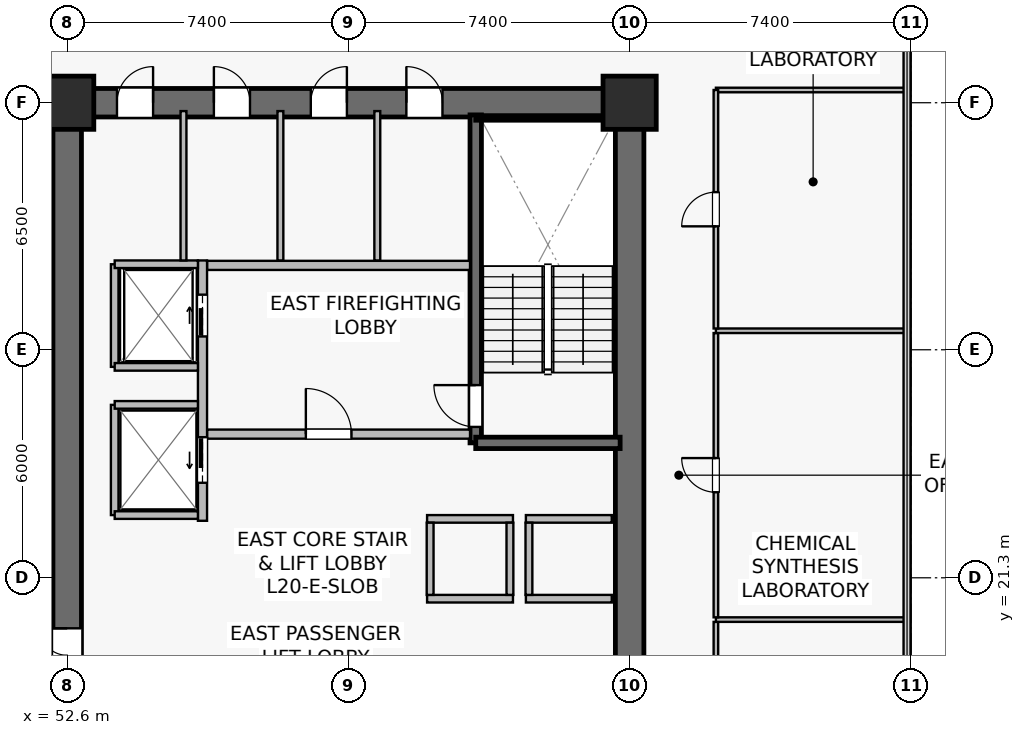
"""IFC4 building model, lengths in metres.
Left out: names, types, materials, properties, quantities, classifications, styles, units other than length and angle.
Written with IfcOpenShell. Run it as: python <this file> out.ifc"""

import sys

from ifc_helpers import new_model, si_unit, direction, frame, frame_2d, origin, origin_2d, place, context, subcontext, project, spatial, rectangle, extrude, source, transform, mapped, element, fill, save


model = new_model("IFC4")
c1 = context("Model", 3, precision=1e-05, world=origin(), true_north=direction((0.0, 1.0)))
c2 = subcontext(c1, "Body", "Model", "MODEL_VIEW")
j1 = project(units=[si_unit("LENGTHUNIT", "METRE"), si_unit("PLANEANGLEUNIT", "RADIAN")], contexts=[c1])
p1 = place(None, origin())
s1 = spatial("IfcSite", under=j1, at=p1, CompositionType="ELEMENT")
p2 = place(p1, origin())
s2 = spatial("IfcBuilding", under=s1, at=p2, CompositionType="ELEMENT")
p3 = place(p2, frame((0.0, 0.0, 82.6)))
s3 = spatial("IfcBuildingStorey", under=s2, at=p3, CompositionType="ELEMENT", Elevation=82.6)
p4 = place(p3, frame((52.225, 33.8, 0.0), z_axis=(0.0, 0.0, 1.0), x_axis=(1.0, 0.0, 0.0)))
e1 = element("IfcWall", 1, at=p4, inside=s3, PredefinedType="SHEAR", context=c2, shape_type="SweptSolid", body=[
    extrude(rectangle(XDim=15.55, YDim=0.75, at=frame_2d((7.775, 0.0))), origin(), (0.0, 0.0, 1.0), 3.78),
])
p5 = place(p4, frame((9.3, 0.0, 0.0)))
e2 = element("IfcOpeningElement", 2, at=p5, cuts=e1, PredefinedType="OPENING", context=c2, shape_type="SweptSolid", body=[
    extrude(rectangle(XDim=0.95, YDim=2.15, at=frame_2d((0.475, 1.075))), frame((0.0, 0.385, 0.0), z_axis=(0.0, -1.0, 0.0), x_axis=(1.0, 0.0, 0.0)), (0.0, 0.0, 1.0), 0.77),
])
p6 = place(p4, frame((6.785, 0.0, 0.0)))
e3 = element("IfcOpeningElement", 3, at=p6, cuts=e1, PredefinedType="OPENING", context=c2, shape_type="SweptSolid", body=[
    extrude(rectangle(XDim=0.95, YDim=2.15, at=frame_2d((0.475, 1.075))), frame((0.0, 0.385, 0.0), z_axis=(0.0, -1.0, 0.0), x_axis=(1.0, 0.0, 0.0)), (0.0, 0.0, 1.0), 0.77),
])
p7 = place(p4, frame((4.235, 0.0, 0.0)))
e4 = element("IfcOpeningElement", 4, at=p7, cuts=e1, PredefinedType="OPENING", context=c2, shape_type="SweptSolid", body=[
    extrude(rectangle(XDim=0.95, YDim=2.15, at=frame_2d((0.475, 1.075))), frame((0.0, 0.385, 0.0), z_axis=(0.0, -1.0, 0.0), x_axis=(1.0, 0.0, 0.0)), (0.0, 0.0, 1.0), 0.77),
])
p8 = place(p4, frame((1.685, 0.0, 0.0)))
e5 = element("IfcOpeningElement", 5, at=p8, cuts=e1, PredefinedType="OPENING", context=c2, shape_type="SweptSolid", body=[
    extrude(rectangle(XDim=0.95, YDim=2.15, at=frame_2d((0.475, 1.075))), frame((0.0, 0.385, 0.0), z_axis=(0.0, -1.0, 0.0), x_axis=(1.0, 0.0, 0.0)), (0.0, 0.0, 1.0), 0.77),
])
p9 = place(p3, frame((52.6, 15.175, 0.0), z_axis=(0.0, 0.0, 1.0), x_axis=(0.0, 1.0, 0.0)))
e6 = element("IfcWall", 6, at=p9, inside=s3, PredefinedType="SHEAR", context=c2, shape_type="SweptSolid", body=[
    extrude(rectangle(XDim=18.25, YDim=0.75, at=frame_2d((9.125, 0.0))), origin(), (0.0, 0.0, 1.0), 3.78),
])
p10 = place(p9, frame((3.375, 0.0, 0.0)))
e7 = element("IfcOpeningElement", 7, at=p10, cuts=e6, PredefinedType="OPENING", context=c2, shape_type="SweptSolid", body=[
    extrude(rectangle(XDim=1.42, YDim=2.2, at=frame_2d((0.71, 1.1))), frame((0.0, 0.385, 0.0), z_axis=(0.0, -1.0, 0.0), x_axis=(1.0, 0.0, 0.0)), (0.0, 0.0, 1.0), 0.77),
])
p11 = place(p3, frame((67.4, 15.175, 0.0), z_axis=(0.0, 0.0, 1.0), x_axis=(0.0, 1.0, 0.0)))
e8 = element("IfcWall", 8, at=p11, inside=s3, PredefinedType="SHEAR", context=c2, shape_type="SweptSolid", body=[
    extrude(rectangle(XDim=18.25, YDim=0.75, at=frame_2d((9.125, 0.0))), origin(), (0.0, 0.0, 1.0), 3.78),
])
p12 = place(p3, frame((63.35, 24.85, 0.0), z_axis=(0.0, 0.0, 1.0), x_axis=(0.0, 1.0, 0.0)))
e9 = element("IfcWall", 9, at=p12, inside=s3, PredefinedType="SHEAR", context=c2, shape_type="SweptSolid", body=[
    extrude(rectangle(XDim=8.63, YDim=0.3, at=frame_2d((4.315, 0.0))), origin(), (0.0, 0.0, 1.0), 3.78),
])
p13 = place(p12, frame((0.42, 0.0, 0.0)))
e10 = element("IfcOpeningElement", 10, at=p13, cuts=e9, PredefinedType="OPENING", context=c2, shape_type="SweptSolid", body=[
    extrude(rectangle(XDim=1.1, YDim=2.15, at=frame_2d((0.55, 1.075))), frame((0.0, 0.16, 0.0), z_axis=(0.0, -1.0, 0.0), x_axis=(1.0, 0.0, 0.0)), (0.0, 0.0, 1.0), 0.32),
])
p14 = place(p3, frame((63.35, 24.85, 0.0), z_axis=(0.0, 0.0, 1.0), x_axis=(1.0, 0.0, 0.0)))
e11 = element("IfcWall", 11, at=p14, inside=s3, PredefinedType="SHEAR", context=c2, shape_type="SweptSolid", body=[
    extrude(rectangle(XDim=3.8, YDim=0.3, at=frame_2d((1.9, 0.0))), origin(), (0.0, 0.0, 1.0), 3.78),
])
p15 = place(p3, frame((63.35, 33.4, 0.0), z_axis=(0.0, 0.0, 1.0), x_axis=(1.0, 0.0, 0.0)))
e12 = element("IfcWall", 12, at=p15, inside=s3, PredefinedType="SOLIDWALL", context=c2, shape_type="SweptSolid", body=[
    extrude(rectangle(XDim=3.72, YDim=0.12, at=frame_2d((1.86, 0.0))), origin(), (0.0, 0.0, 1.0), 3.78),
])
m1 = source(origin(), c2, "Body", "SweptSolid", [
    extrude(rectangle(XDim=1.4, YDim=1.4, at=origin_2d()), origin(), (0.0, 0.0, 1.0), 4.1),
])
for number, where, z_axis, x_axis in (
    (13, (52.6, 33.8, 0.0), (0.0, 0.0, 1.0), (1.0, 0.0, 0.0)),
    (14, (67.4, 33.8, 0.0), (0.0, 0.0, 1.0), (1.0, 0.0, 0.0)),
):
    element("IfcColumn", number, at=place(p3, frame(where, z_axis=z_axis, x_axis=x_axis)), inside=s3, PredefinedType="COLUMN", context=c2, shape_type="MappedRepresentation", body=[
        mapped(m1, transform((0.0, 0.0, 0.0), scale=1.0)),
    ])
p16 = place(p3, frame((56.28, 25.08, 0.0), z_axis=(0.0, 0.0, 1.0), x_axis=(1.0, 0.0, 0.0)))
e15 = element("IfcWall", 15, at=p16, inside=s3, PredefinedType="SOLIDWALL", context=c2, shape_type="SweptSolid", body=[
    extrude(rectangle(XDim=6.92, YDim=0.24, at=frame_2d((3.46, 0.0))), origin(), (0.0, 0.0, 1.0), 3.115),
])
p17 = place(p16, frame((2.6, 0.0, 0.0)))
e16 = element("IfcOpeningElement", 16, at=p17, cuts=e15, PredefinedType="OPENING", context=c2, shape_type="SweptSolid", body=[
    extrude(rectangle(XDim=1.2, YDim=2.16, at=frame_2d((0.6, 1.08))), frame((0.0, 0.13, 0.0), z_axis=(0.0, -1.0, 0.0), x_axis=(1.0, 0.0, 0.0)), (0.0, 0.0, 1.0), 0.26),
])
p18 = place(p3, frame((56.28, 29.52, 0.0), z_axis=(0.0, 0.0, 1.0), x_axis=(1.0, 0.0, 0.0)))
e17 = element("IfcWall", 17, at=p18, inside=s3, PredefinedType="SOLIDWALL", context=c2, shape_type="SweptSolid", body=[
    extrude(rectangle(XDim=6.92, YDim=0.24, at=frame_2d((3.46, 0.0))), origin(), (0.0, 0.0, 1.0), 3.115),
])
p19 = place(p3, frame((56.16, 22.8, 0.0), z_axis=(0.0, 0.0, 1.0), x_axis=(0.0, 1.0, 0.0)))
e18 = element("IfcWall", 18, at=p19, inside=s3, PredefinedType="SOLIDWALL", context=c2, shape_type="SweptSolid", body=[
    extrude(rectangle(XDim=6.85, YDim=0.24, at=frame_2d((3.425, 0.0))), origin(), (0.0, 0.0, 1.0), 2.865),
])
p20 = place(p19, frame((4.85, 0.0, 0.0)))
e19 = element("IfcOpeningElement", 19, at=p20, cuts=e18, PredefinedType="OPENING", context=c2, shape_type="SweptSolid", body=[
    extrude(rectangle(XDim=1.1, YDim=2.22, at=frame_2d((0.55, 1.11))), frame((0.0, 0.13, 0.0), z_axis=(0.0, -1.0, 0.0), x_axis=(1.0, 0.0, 0.0)), (0.0, 0.0, 1.0), 0.26),
])
p21 = place(p19, frame((1.0, 0.0, 0.0)))
e20 = element("IfcOpeningElement", 20, at=p21, cuts=e18, PredefinedType="OPENING", context=c2, shape_type="SweptSolid", body=[
    extrude(rectangle(XDim=1.2, YDim=2.22, at=frame_2d((0.6, 1.11))), frame((0.0, 0.13, 0.0), z_axis=(0.0, -1.0, 0.0), x_axis=(1.0, 0.0, 0.0)), (0.0, 0.0, 1.0), 0.26),
])
for number, where, z_axis, x_axis in (
    (21, (64.67, 20.75, 0.0), (0.0, 0.0, 1.0), (1.0, 0.0, 0.0)),
    (22, (64.67, 22.85, 0.0), (0.0, 0.0, 1.0), (1.0, 0.0, 0.0)),
):
    element("IfcWall", number, at=place(p3, frame(where, z_axis=z_axis, x_axis=x_axis)), inside=s3, PredefinedType="SOLIDWALL", context=c2, shape_type="SweptSolid", body=[
        extrude(rectangle(XDim=2.26, YDim=0.2, at=frame_2d((1.13, 0.0))), origin(), (0.0, 0.0, 1.0), 3.78),
    ])
p22 = place(p3, frame((64.75, 20.85, 0.0), z_axis=(0.0, 0.0, 1.0), x_axis=(0.0, 1.0, 0.0)))
e23 = element("IfcWall", 23, at=p22, inside=s3, PredefinedType="SOLIDWALL", context=c2, shape_type="SweptSolid", body=[
    extrude(rectangle(XDim=1.9, YDim=0.18, at=frame_2d((0.95, 0.0))), origin(), (0.0, 0.0, 1.0), 3.78),
])
for number, where, z_axis, x_axis in (
    (24, (62.07, 20.75, 0.0), (0.0, 0.0, 1.0), (1.0, 0.0, 0.0)),
    (25, (62.07, 22.85, 0.0), (0.0, 0.0, 1.0), (1.0, 0.0, 0.0)),
):
    element("IfcWall", number, at=place(p3, frame(where, z_axis=z_axis, x_axis=x_axis)), inside=s3, PredefinedType="SOLIDWALL", context=c2, shape_type="SweptSolid", body=[
        extrude(rectangle(XDim=2.26, YDim=0.2, at=frame_2d((1.13, 0.0))), origin(), (0.0, 0.0, 1.0), 3.78),
    ])
for number, where, z_axis, x_axis in (
    (26, (62.15, 20.85, 0.0), (0.0, 0.0, 1.0), (0.0, 1.0, 0.0)),
    (27, (64.25, 20.85, 0.0), (0.0, 0.0, 1.0), (0.0, 1.0, 0.0)),
):
    element("IfcWall", number, at=place(p3, frame(where, z_axis=z_axis, x_axis=x_axis)), inside=s3, PredefinedType="SOLIDWALL", context=c2, shape_type="SweptSolid", body=[
        extrude(rectangle(XDim=1.9, YDim=0.18, at=frame_2d((0.95, 0.0))), origin(), (0.0, 0.0, 1.0), 3.78),
    ])
p23 = place(p3, frame((53.85, 26.85, 0.0), z_axis=(0.0, 0.0, 1.0), x_axis=(0.0, 1.0, 0.0)))
e28 = element("IfcWall", 28, at=p23, inside=s3, PredefinedType="SOLIDWALL", context=c2, shape_type="SweptSolid", body=[
    extrude(rectangle(XDim=2.7, YDim=0.2, at=frame_2d((1.35, 0.0))), origin(), (0.0, 0.0, 1.0), 3.78),
])
p24 = place(p3, frame((53.85, 29.55, 0.0), z_axis=(0.0, 0.0, 1.0), x_axis=(1.0, 0.0, 0.0)))
e29 = element("IfcWall", 29, at=p24, inside=s3, PredefinedType="SOLIDWALL", context=c2, shape_type="SweptSolid", body=[
    extrude(rectangle(XDim=2.19, YDim=0.2, at=frame_2d((1.095, 0.0))), origin(), (0.0, 0.0, 1.0), 3.78),
])
p25 = place(p3, frame((53.85, 26.85, 0.0), z_axis=(0.0, 0.0, 1.0), x_axis=(1.0, 0.0, 0.0)))
e30 = element("IfcWall", 30, at=p25, inside=s3, PredefinedType="SOLIDWALL", context=c2, shape_type="SweptSolid", body=[
    extrude(rectangle(XDim=2.19, YDim=0.2, at=frame_2d((1.095, 0.0))), origin(), (0.0, 0.0, 1.0), 3.177),
])
p26 = place(p3, frame((53.85, 22.95, 0.0), z_axis=(0.0, 0.0, 1.0), x_axis=(0.0, 1.0, 0.0)))
e31 = element("IfcWall", 31, at=p26, inside=s3, PredefinedType="SOLIDWALL", context=c2, shape_type="SweptSolid", body=[
    extrude(rectangle(XDim=2.9, YDim=0.2, at=frame_2d((1.45, 0.0))), origin(), (0.0, 0.0, 1.0), 2.865),
])
for number, where, z_axis, x_axis in (
    (32, (53.85, 25.85, 0.0), (0.0, 0.0, 1.0), (1.0, 0.0, 0.0)),
    (33, (53.85, 22.95, 0.0), (0.0, 0.0, 1.0), (1.0, 0.0, 0.0)),
):
    element("IfcWall", number, at=place(p3, frame(where, z_axis=z_axis, x_axis=x_axis)), inside=s3, PredefinedType="SOLIDWALL", context=c2, shape_type="SweptSolid", body=[
        extrude(rectangle(XDim=2.19, YDim=0.2, at=frame_2d((1.095, 0.0))), origin(), (0.0, 0.0, 1.0), 3.78),
    ])
for number, where, z_axis, x_axis in (
    (34, (60.76, 29.65, 0.0), (0.0, 0.0, 1.0), (0.0, 1.0, 0.0)),
    (35, (58.21, 29.65, 0.0), (0.0, 0.0, 1.0), (0.0, 1.0, 0.0)),
    (36, (55.66, 29.65, 0.0), (0.0, 0.0, 1.0), (0.0, 1.0, 0.0)),
):
    element("IfcWall", number, at=place(p3, frame(where, z_axis=z_axis, x_axis=x_axis)), inside=s3, PredefinedType="PLUMBINGWALL", context=c2, shape_type="SweptSolid", body=[
        extrude(rectangle(XDim=3.93, YDim=0.155, at=frame_2d((1.965, 0.0))), origin(), (0.0, 0.0, 1.0), 3.78),
    ])
p27 = place(p3, frame((69.67, 34.135, 0.0), z_axis=(0.0, 0.0, 1.0), x_axis=(1.0, 0.0, 0.0)))
e37 = element("IfcWall", 37, at=p27, inside=s3, PredefinedType="PARTITIONING", context=c2, shape_type="SweptSolid", body=[
    extrude(rectangle(XDim=5.02, YDim=0.12, at=frame_2d((2.51, 0.0))), origin(), (0.0, 0.0, 1.0), 3.78),
])
p28 = place(p3, frame((69.67, 14.465, 0.0), z_axis=(0.0, 0.0, 1.0), x_axis=(0.0, 1.0, 0.0)))
e38 = element("IfcWall", 38, at=p28, inside=s3, PredefinedType="PARTITIONING", context=c2, shape_type="SweptSolid", body=[
    extrude(rectangle(XDim=5.675, YDim=0.12, at=frame_2d((2.837, 0.0))), origin(), (0.0, 0.0, 1.0), 3.78),
])
p29 = place(p28, frame((2.387, 0.0, 0.0)))
e39 = element("IfcOpeningElement", 39, at=p29, cuts=e38, PredefinedType="OPENING", context=c2, shape_type="SweptSolid", body=[
    extrude(rectangle(XDim=0.9, YDim=2.1, at=frame_2d((0.45, 1.05))), frame((0.0, 0.07, 0.0), z_axis=(0.0, -1.0, 0.0), x_axis=(1.0, 0.0, 0.0)), (0.0, 0.0, 1.0), 0.14),
])
p30 = place(p3, frame((69.67, 20.2, 0.0), z_axis=(0.0, 0.0, 1.0), x_axis=(1.0, 0.0, 0.0)))
e40 = element("IfcWall", 40, at=p30, inside=s3, PredefinedType="PARTITIONING", context=c2, shape_type="SweptSolid", body=[
    extrude(rectangle(XDim=5.02, YDim=0.12, at=frame_2d((2.51, 0.0))), origin(), (0.0, 0.0, 1.0), 3.78),
])
p31 = place(p3, frame((69.67, 20.26, 0.0), z_axis=(0.0, 0.0, 1.0), x_axis=(0.0, 1.0, 0.0)))
e41 = element("IfcWall", 41, at=p31, inside=s3, PredefinedType="PARTITIONING", context=c2, shape_type="SweptSolid", body=[
    extrude(rectangle(XDim=7.48, YDim=0.12, at=frame_2d((3.74, 0.0))), origin(), (0.0, 0.0, 1.0), 3.78),
])
p32 = place(p31, frame((3.29, 0.0, 0.0)))
e42 = element("IfcOpeningElement", 42, at=p32, cuts=e41, PredefinedType="OPENING", context=c2, shape_type="SweptSolid", body=[
    extrude(rectangle(XDim=0.9, YDim=2.1, at=frame_2d((0.45, 1.05))), frame((0.0, 0.07, 0.0), z_axis=(0.0, -1.0, 0.0), x_axis=(1.0, 0.0, 0.0)), (0.0, 0.0, 1.0), 0.14),
])
p33 = place(p3, frame((69.67, 27.8, 0.0), z_axis=(0.0, 0.0, 1.0), x_axis=(1.0, 0.0, 0.0)))
e43 = element("IfcWall", 43, at=p33, inside=s3, PredefinedType="PARTITIONING", context=c2, shape_type="SweptSolid", body=[
    extrude(rectangle(XDim=5.02, YDim=0.12, at=frame_2d((2.51, 0.0))), origin(), (0.0, 0.0, 1.0), 3.78),
])
p34 = place(p3, frame((69.67, 27.86, 0.0), z_axis=(0.0, 0.0, 1.0), x_axis=(0.0, 1.0, 0.0)))
e44 = element("IfcWall", 44, at=p34, inside=s3, PredefinedType="PARTITIONING", context=c2, shape_type="SweptSolid", body=[
    extrude(rectangle(XDim=6.275, YDim=0.12, at=frame_2d((3.137, 0.0))), origin(), (0.0, 0.0, 1.0), 3.78),
])
p35 = place(p34, frame((2.688, 0.0, 0.0)))
e45 = element("IfcOpeningElement", 45, at=p35, cuts=e44, PredefinedType="OPENING", context=c2, shape_type="SweptSolid", body=[
    extrude(rectangle(XDim=0.9, YDim=2.1, at=frame_2d((0.45, 1.05))), frame((0.0, 0.07, 0.0), z_axis=(0.0, -1.0, 0.0), x_axis=(1.0, 0.0, 0.0)), (0.0, 0.0, 1.0), 0.14),
])
m2 = source(origin(), c2, "Body", "SweptSolid", [
    extrude(rectangle(XDim=1.1, YDim=2.15, at=frame_2d((0.55, 1.075))), frame((0.0, 0.025, 0.0), z_axis=(0.0, -1.0, 0.0), x_axis=(1.0, 0.0, 0.0)), (0.0, 0.0, 1.0), 0.05),
])
p36 = place(p13, origin())
e46 = element("IfcDoor", 46, at=p36, inside=s3, OperationType="SINGLE_SWING_RIGHT", PredefinedType="DOOR", context=c2, shape_type="MappedRepresentation", body=[
    mapped(m2, transform((0.0, 0.0, 0.0), scale=1.0)),
])
fill(e10, e46)
m3 = source(origin(), c2, "Body", "SweptSolid", [
    extrude(rectangle(XDim=1.2, YDim=2.16, at=frame_2d((0.6, 1.08))), frame((0.0, 0.025, 0.0), z_axis=(0.0, -1.0, 0.0), x_axis=(1.0, 0.0, 0.0)), (0.0, 0.0, 1.0), 0.05),
])
p37 = place(p17, origin())
e47 = element("IfcDoor", 47, at=p37, inside=s3, OperationType="SINGLE_SWING_LEFT", PredefinedType="DOOR", context=c2, shape_type="MappedRepresentation", body=[
    mapped(m3, transform((0.0, 0.0, 0.0), scale=1.0)),
])
fill(e16, e47)
m4 = source(origin(), c2, "Body", "SweptSolid", [
    extrude(rectangle(XDim=1.1, YDim=2.22, at=frame_2d((0.55, 1.11))), frame((0.0, 0.025, 0.0), z_axis=(0.0, -1.0, 0.0), x_axis=(1.0, 0.0, 0.0)), (0.0, 0.0, 1.0), 0.05),
])
p38 = place(p20, origin())
e48 = element("IfcDoor", 48, at=p38, inside=s3, OperationType="SLIDING_TO_RIGHT", PredefinedType="USERDEFINED", context=c2, shape_type="MappedRepresentation", body=[
    mapped(m4, transform((0.0, 0.0, 0.0), scale=1.0)),
])
fill(e19, e48)
m5 = source(origin(), c2, "Body", "SweptSolid", [
    extrude(rectangle(XDim=1.2, YDim=2.22, at=frame_2d((0.6, 1.11))), frame((0.0, 0.025, 0.0), z_axis=(0.0, -1.0, 0.0), x_axis=(1.0, 0.0, 0.0)), (0.0, 0.0, 1.0), 0.05),
])
p39 = place(p21, origin())
e49 = element("IfcDoor", 49, at=p39, inside=s3, OperationType="SLIDING_TO_LEFT", PredefinedType="USERDEFINED", context=c2, shape_type="MappedRepresentation", body=[
    mapped(m5, transform((0.0, 0.0, 0.0), scale=1.0)),
])
fill(e20, e49)
m6 = source(origin(), c2, "Body", "SweptSolid", [
    extrude(rectangle(XDim=1.42, YDim=2.2, at=frame_2d((0.71, 1.1))), frame((0.0, 0.025, 0.0), z_axis=(0.0, -1.0, 0.0), x_axis=(1.0, 0.0, 0.0)), (0.0, 0.0, 1.0), 0.05),
])
p40 = place(p10, origin())
e50 = element("IfcDoor", 50, at=p40, inside=s3, OperationType="DOUBLE_DOOR_SINGLE_SWING", PredefinedType="DOOR", context=c2, shape_type="MappedRepresentation", body=[
    mapped(m6, transform((0.0, 0.0, 0.0), scale=1.0)),
])
fill(e7, e50)
m7 = source(origin(), c2, "Body", "SweptSolid", [
    extrude(rectangle(XDim=0.95, YDim=2.15, at=frame_2d((0.475, 1.075))), frame((0.0, 0.025, 0.0), z_axis=(0.0, -1.0, 0.0), x_axis=(1.0, 0.0, 0.0)), (0.0, 0.0, 1.0), 0.05),
])
p41 = place(p5, origin())
e51 = element("IfcDoor", 51, at=p41, inside=s3, OperationType="SINGLE_SWING_LEFT", PredefinedType="DOOR", context=c2, shape_type="MappedRepresentation", body=[
    mapped(m7, transform((0.0, 0.0, 0.0), scale=1.0)),
])
fill(e2, e51)
p42 = place(p6, origin())
e52 = element("IfcDoor", 52, at=p42, inside=s3, OperationType="SINGLE_SWING_RIGHT", PredefinedType="DOOR", context=c2, shape_type="MappedRepresentation", body=[
    mapped(m7, transform((0.0, 0.0, 0.0), scale=1.0)),
])
fill(e3, e52)
p43 = place(p7, origin())
e53 = element("IfcDoor", 53, at=p43, inside=s3, OperationType="SINGLE_SWING_LEFT", PredefinedType="DOOR", context=c2, shape_type="MappedRepresentation", body=[
    mapped(m7, transform((0.0, 0.0, 0.0), scale=1.0)),
])
fill(e4, e53)
p44 = place(p8, origin())
e54 = element("IfcDoor", 54, at=p44, inside=s3, OperationType="SINGLE_SWING_RIGHT", PredefinedType="DOOR", context=c2, shape_type="MappedRepresentation", body=[
    mapped(m7, transform((0.0, 0.0, 0.0), scale=1.0)),
])
fill(e5, e54)
m8 = source(origin(), c2, "Body", "SweptSolid", [
    extrude(rectangle(XDim=0.9, YDim=2.1, at=frame_2d((0.45, 1.05))), frame((0.0, 0.025, 0.0), z_axis=(0.0, -1.0, 0.0), x_axis=(1.0, 0.0, 0.0)), (0.0, 0.0, 1.0), 0.05),
])
p45 = place(p32, origin())
e55 = element("IfcDoor", 55, at=p45, inside=s3, OperationType="SINGLE_SWING_RIGHT", PredefinedType="DOOR", context=c2, shape_type="MappedRepresentation", body=[
    mapped(m8, transform((0.0, 0.0, 0.0), scale=1.0)),
])
fill(e42, e55)
p46 = place(p35, origin())
e56 = element("IfcDoor", 56, at=p46, inside=s3, OperationType="SINGLE_SWING_LEFT", PredefinedType="DOOR", context=c2, shape_type="MappedRepresentation", body=[
    mapped(m8, transform((0.0, 0.0, 0.0), scale=1.0)),
])
fill(e45, e56)
save(model, sys.argv[1])
